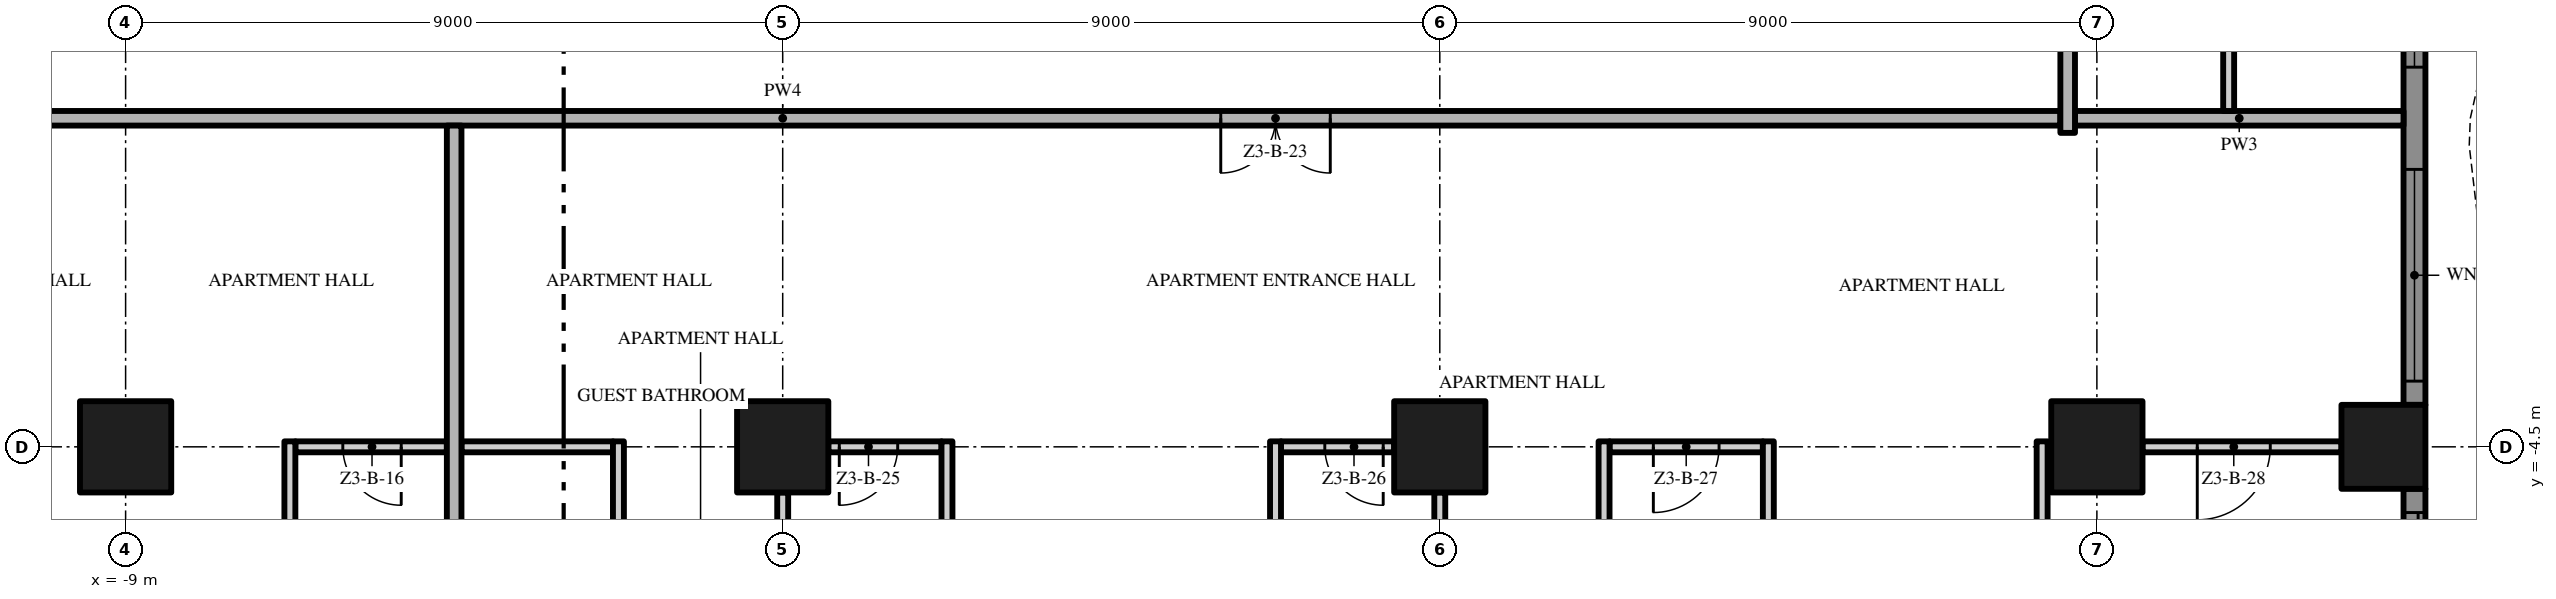
"""IFC4 building model, lengths in metres.
Left out: names, types, materials, properties, quantities, classifications, styles, units other than length and angle.
Written with IfcOpenShell. Run it as: python <this file> out.ifc"""

import sys

from ifc_helpers import new_model, si_unit, direction, frame, frame_2d, origin, origin_2d, place, context, subcontext, project, spatial, polyline, rectangle, outline, extrude, element, fill, save


model = new_model("IFC4")
c1 = context("Model", 3, precision=1e-05, world=origin(), true_north=direction((0.0, 1.0)))
c2 = subcontext(c1, "Body", "Model", "MODEL_VIEW")
j1 = project(units=[si_unit("LENGTHUNIT", "METRE"), si_unit("PLANEANGLEUNIT", "RADIAN")], contexts=[c1])
p1 = place(None, origin())
s1 = spatial("IfcSite", under=j1, at=p1, CompositionType="ELEMENT")
p2 = place(p1, origin())
s2 = spatial("IfcBuilding", under=s1, at=p2, CompositionType="ELEMENT")
p3 = place(p2, frame((0.0, 0.0, 140.2)))
s3 = spatial("IfcBuildingStorey", under=s2, at=p3, CompositionType="ELEMENT", Elevation=140.2)
for number, where, z_axis, x_axis in (
    (1, (-9.0, -4.5, 0.0), (0.0, 0.0, 1.0), (1.0, 0.0, 0.0)),
    (2, (0.0, -4.5, 0.0), (0.0, 0.0, 1.0), (1.0, 0.0, 0.0)),
    (3, (18.0, -4.5, 0.0), (0.0, 0.0, 1.0), (1.0, 0.0, 0.0)),
):
    element("IfcColumn", number, at=place(p3, frame(where, z_axis=z_axis, x_axis=x_axis)), inside=s3, PredefinedType="COLUMN", context=c2, shape_type="SweptSolid", body=[
        extrude(rectangle(XDim=1.25, YDim=1.25, at=origin_2d()), origin(), (0.0, 0.0, 1.0), 3.5),
    ])
p4 = place(p3, frame((21.925, -4.5, 0.0), z_axis=(0.0, 0.0, 1.0), x_axis=(1.0, 0.0, 0.0)))
e4 = element("IfcColumn", 4, at=p4, inside=s3, PredefinedType="COLUMN", context=c2, shape_type="SweptSolid", body=[
    extrude(rectangle(XDim=1.15, YDim=1.15, at=origin_2d()), origin(), (0.0, 0.0, 1.0), 3.5),
])
p5 = place(p3, frame((9.0, -4.5, 0.0), z_axis=(0.0, 0.0, 1.0), x_axis=(1.0, 0.0, 0.0)))
e5 = element("IfcColumn", 5, at=p5, inside=s3, PredefinedType="COLUMN", context=c2, shape_type="SweptSolid", body=[
    extrude(rectangle(XDim=1.25, YDim=1.25, at=origin_2d()), origin(), (0.0, 0.0, 1.0), 3.5),
])
p6 = place(p3, frame((22.35, -5.075, 0.0), z_axis=(0.0, 0.0, 1.0), x_axis=(0.0, -1.0, 0.0)))
e6 = element("IfcWall", 6, at=p6, inside=s3, PredefinedType="SOLIDWALL", context=c2, shape_type="SweptSolid", body=[
    extrude(rectangle(XDim=7.275, YDim=0.3, at=frame_2d((3.638, 0.0))), origin(), (0.0, 0.0, 1.0), 3.5),
])
p7 = place(p6, frame((4.625, 0.0, 0.45)))
e7 = element("IfcOpeningElement", 7, at=p7, cuts=e6, PredefinedType="OPENING", context=c2, shape_type="SweptSolid", body=[
    extrude(rectangle(XDim=2.35, YDim=2.65, at=frame_2d((1.175, 1.325))), frame((0.0, 0.16, 0.0), z_axis=(0.0, -1.0, 0.0), x_axis=(1.0, 0.0, 0.0)), (0.0, 0.0, 1.0), 0.32),
])
p8 = place(p6, frame((0.325, 0.0, 0.0)))
e8 = element("IfcOpeningElement", 8, at=p8, cuts=e6, PredefinedType="OPENING", context=c2, shape_type="SweptSolid", body=[
    extrude(rectangle(XDim=2.9, YDim=2.4, at=frame_2d((1.45, 1.2))), frame((0.0, 0.16, 0.0), z_axis=(0.0, -1.0, 0.0), x_axis=(1.0, 0.0, 0.0)), (0.0, 0.0, 1.0), 0.32),
])
p9 = place(p3, frame((22.35, 3.925, 0.0), z_axis=(0.0, 0.0, 1.0), x_axis=(0.0, -1.0, 0.0)))
e9 = element("IfcWall", 9, at=p9, inside=s3, PredefinedType="SOLIDWALL", context=c2, shape_type="SweptSolid", body=[
    extrude(rectangle(XDim=7.85, YDim=0.3, at=frame_2d((3.925, 0.0))), origin(), (0.0, 0.0, 1.0), 3.5),
])
p10 = place(p9, frame((4.625, 0.0, 0.45)))
e10 = element("IfcOpeningElement", 10, at=p10, cuts=e9, PredefinedType="OPENING", context=c2, shape_type="SweptSolid", body=[
    extrude(rectangle(XDim=2.9, YDim=2.65, at=frame_2d((1.45, 1.325))), frame((0.0, 0.16, 0.0), z_axis=(0.0, -1.0, 0.0), x_axis=(1.0, 0.0, 0.0)), (0.0, 0.0, 1.0), 0.32),
])
p11 = place(p9, frame((0.325, 0.0, 0.45)))
e11 = element("IfcOpeningElement", 11, at=p11, cuts=e9, PredefinedType="OPENING", context=c2, shape_type="SweptSolid", body=[
    extrude(rectangle(XDim=2.9, YDim=2.65, at=frame_2d((1.45, 1.325))), frame((0.0, 0.16, 0.0), z_axis=(0.0, -1.0, 0.0), x_axis=(1.0, 0.0, 0.0)), (0.0, 0.0, 1.0), 0.32),
])
p12 = place(p3, origin())
e12 = element("IfcWall", 12, at=p12, inside=s3, PredefinedType="USERDEFINED", context=c2, shape_type="SweptSolid", body=[
    extrude(outline(polyline([(23.451, -13.5), (24.112, -12.0), (24.845, -10.5), (25.369, -9.0), (25.5, -7.875), (25.485, -7.5), (25.149, -6.0), (24.488, -4.5), (23.755, -3.0), (23.231, -1.5), (23.1, -0.375), (23.115, 0.0), (23.451, 1.5), (24.112, 3.0), (24.845, 4.5), (25.369, 6.0), (25.5, 7.125), (25.485, 7.5), (25.149, 9.0), (24.488, 10.5), (23.755, 12.0), (23.231, 13.5), (23.1, 14.625), (23.115, 15.0), (23.451, 16.5), (24.112, 18.0), (23.883, 18.101), (23.213, 16.579), (22.866, 15.033), (22.849, 14.615), (22.986, 13.444), (23.524, 11.904), (24.261, 10.395), (24.91, 8.921), (25.236, 7.467), (25.249, 7.135), (25.124, 6.056), (24.614, 4.596), (23.885, 3.105), (23.213, 1.579), (22.866, 0.033), (22.849, -0.385), (22.986, -1.556), (23.524, -3.096), (24.261, -4.605), (24.91, -6.079), (25.236, -7.533), (25.249, -7.865), (25.124, -8.944), (24.614, -10.404), (23.885, -11.895), (23.223, -13.399), (23.451, -13.5)])), origin(), (0.0, 0.0, 1.0), 0.9),
])
p13 = place(p3, frame((-4.6, -4.5, 0.0), z_axis=(0.0, 0.0, 1.0), x_axis=(-1.0, 0.0, 0.0)))
e13 = element("IfcWall", 13, at=p13, inside=s3, PredefinedType="PARTITIONING", context=c2, shape_type="SweptSolid", body=[
    extrude(rectangle(XDim=2.075, YDim=0.15, at=frame_2d((1.038, 0.0))), origin(), (0.0, 0.0, 1.0), 3.5),
])
p14 = place(p13, frame((0.625, 0.0, 0.0)))
e14 = element("IfcOpeningElement", 14, at=p14, cuts=e13, PredefinedType="OPENING", context=c2, shape_type="SweptSolid", body=[
    extrude(rectangle(XDim=0.8, YDim=2.0, at=frame_2d((0.4, 1.0))), frame((0.0, 0.085, 0.0), z_axis=(0.0, -1.0, 0.0), x_axis=(1.0, 0.0, 0.0)), (0.0, 0.0, 1.0), 0.17),
])
p15 = place(p3, frame((-4.4, -4.5, 0.0), z_axis=(0.0, 0.0, 1.0), x_axis=(1.0, 0.0, 0.0)))
e15 = element("IfcWall", 15, at=p15, inside=s3, PredefinedType="PARTITIONING", context=c2, shape_type="SweptSolid", body=[
    extrude(rectangle(XDim=2.075, YDim=0.15, at=frame_2d((1.038, 0.0))), origin(), (0.0, 0.0, 1.0), 3.5),
])
p16 = place(p3, frame((2.175, -4.5, 0.0), z_axis=(0.0, 0.0, 1.0), x_axis=(-1.0, 0.0, 0.0)))
e16 = element("IfcWall", 16, at=p16, inside=s3, PredefinedType="PARTITIONING", context=c2, shape_type="SweptSolid", body=[
    extrude(rectangle(XDim=1.55, YDim=0.15, at=frame_2d((0.775, 0.0))), origin(), (0.0, 0.0, 1.0), 3.5),
])
p17 = place(p16, frame((0.6, 0.0, 0.0)))
e17 = element("IfcOpeningElement", 17, at=p17, cuts=e16, PredefinedType="OPENING", context=c2, shape_type="SweptSolid", body=[
    extrude(rectangle(XDim=0.8, YDim=2.0, at=frame_2d((0.4, 1.0))), frame((0.0, 0.085, 0.0), z_axis=(0.0, -1.0, 0.0), x_axis=(1.0, 0.0, 0.0)), (0.0, 0.0, 1.0), 0.17),
])
p18 = place(p3, frame((8.375, -4.5, 0.0), z_axis=(0.0, 0.0, 1.0), x_axis=(-1.0, 0.0, 0.0)))
e18 = element("IfcWall", 18, at=p18, inside=s3, PredefinedType="PARTITIONING", context=c2, shape_type="SweptSolid", body=[
    extrude(rectangle(XDim=1.55, YDim=0.15, at=frame_2d((0.775, 0.0))), origin(), (0.0, 0.0, 1.0), 3.5),
])
p19 = place(p18, frame((0.15, 0.0, 0.0)))
e19 = element("IfcOpeningElement", 19, at=p19, cuts=e18, PredefinedType="OPENING", context=c2, shape_type="SweptSolid", body=[
    extrude(rectangle(XDim=0.8, YDim=2.0, at=frame_2d((0.4, 1.0))), frame((0.0, 0.085, 0.0), z_axis=(0.0, -1.0, 0.0), x_axis=(1.0, 0.0, 0.0)), (0.0, 0.0, 1.0), 0.17),
])
p20 = place(p3, frame((13.425, -4.5, 0.0), z_axis=(0.0, 0.0, 1.0), x_axis=(-1.0, 0.0, 0.0)))
e20 = element("IfcWall", 20, at=p20, inside=s3, PredefinedType="PARTITIONING", context=c2, shape_type="SweptSolid", body=[
    extrude(rectangle(XDim=2.1, YDim=0.15, at=frame_2d((1.05, 0.0))), origin(), (0.0, 0.0, 1.0), 3.5),
])
p21 = place(p20, frame((0.6, 0.0, 0.0)))
e21 = element("IfcOpeningElement", 21, at=p21, cuts=e20, PredefinedType="OPENING", context=c2, shape_type="SweptSolid", body=[
    extrude(rectangle(XDim=0.9, YDim=2.1, at=frame_2d((0.45, 1.05))), frame((0.0, 0.085, 0.0), z_axis=(0.0, -1.0, 0.0), x_axis=(1.0, 0.0, 0.0)), (0.0, 0.0, 1.0), 0.17),
])
p22 = place(p3, frame((21.35, -4.5, 0.0), z_axis=(0.0, 0.0, 1.0), x_axis=(-1.0, 0.0, 0.0)))
e22 = element("IfcWall", 22, at=p22, inside=s3, PredefinedType="PARTITIONING", context=c2, shape_type="SweptSolid", body=[
    extrude(rectangle(XDim=2.725, YDim=0.15, at=frame_2d((1.363, 0.0))), origin(), (0.0, 0.0, 1.0), 3.5),
])
p23 = place(p22, frame((0.975, 0.0, 0.0)))
e23 = element("IfcOpeningElement", 23, at=p23, cuts=e22, PredefinedType="OPENING", context=c2, shape_type="SweptSolid", body=[
    extrude(rectangle(XDim=1.0, YDim=2.4, at=frame_2d((0.5, 1.2))), frame((0.0, 0.085, 0.0), z_axis=(0.0, -1.0, 0.0), x_axis=(1.0, 0.0, 0.0)), (0.0, 0.0, 1.0), 0.17),
])
p24 = place(p3, frame((17.5, 0.0, 0.0), z_axis=(0.0, 0.0, 1.0), x_axis=(-1.0, 0.0, 0.0)))
e24 = element("IfcWall", 24, at=p24, inside=s3, PredefinedType="PARTITIONING", context=c2, shape_type="SweptSolid", body=[
    extrude(rectangle(XDim=35.0, YDim=0.2, at=frame_2d((17.5, 0.0))), origin(), (0.0, 0.0, 1.0), 3.5),
])
p25 = place(p24, frame((28.0, 0.0, 0.0)))
e25 = element("IfcOpeningElement", 25, at=p25, cuts=e24, PredefinedType="OPENING", context=c2, shape_type="SweptSolid", body=[
    extrude(rectangle(XDim=1.5, YDim=2.4, at=frame_2d((0.75, 1.2))), frame((0.0, 0.11, 0.0), z_axis=(0.0, -1.0, 0.0), x_axis=(1.0, 0.0, 0.0)), (0.0, 0.0, 1.0), 0.22),
])
p26 = place(p24, frame((10.0, 0.0, 0.0)))
e26 = element("IfcOpeningElement", 26, at=p26, cuts=e24, PredefinedType="OPENING", context=c2, shape_type="SweptSolid", body=[
    extrude(rectangle(XDim=1.5, YDim=2.4, at=frame_2d((0.75, 1.2))), frame((0.0, 0.11, 0.0), z_axis=(0.0, -1.0, 0.0), x_axis=(1.0, 0.0, 0.0)), (0.0, 0.0, 1.0), 0.22),
])
p27 = place(p3, frame((17.7, 0.0, 0.0), z_axis=(0.0, 0.0, 1.0), x_axis=(1.0, 0.0, 0.0)))
e27 = element("IfcWall", 27, at=p27, inside=s3, PredefinedType="PARTITIONING", context=c2, shape_type="SweptSolid", body=[
    extrude(rectangle(XDim=4.5, YDim=0.2, at=frame_2d((2.25, 0.0))), origin(), (0.0, 0.0, 1.0), 3.5),
])
p28 = place(p3, frame((-6.75, -12.075, 0.0), z_axis=(0.0, 0.0, 1.0), x_axis=(0.0, 1.0, 0.0)))
e28 = element("IfcWall", 28, at=p28, inside=s3, PredefinedType="PARTITIONING", context=c2, shape_type="SweptSolid", body=[
    extrude(rectangle(XDim=7.65, YDim=0.15, at=frame_2d((3.825, 0.0))), origin(), (0.0, 0.0, 1.0), 3.5),
])
p29 = place(p3, frame((-4.5, -17.7, 0.0), z_axis=(0.0, 0.0, 1.0), x_axis=(0.0, 1.0, 0.0)))
e29 = element("IfcWall", 29, at=p29, inside=s3, PredefinedType="PARTITIONING", context=c2, shape_type="SweptSolid", body=[
    extrude(rectangle(XDim=17.6, YDim=0.2, at=frame_2d((8.8, 0.0))), origin(), (0.0, 0.0, 1.0), 3.5),
])
p30 = place(p3, frame((-2.25, -12.075, 0.0), z_axis=(0.0, 0.0, 1.0), x_axis=(0.0, 1.0, 0.0)))
e30 = element("IfcWall", 30, at=p30, inside=s3, PredefinedType="PARTITIONING", context=c2, shape_type="SweptSolid", body=[
    extrude(rectangle(XDim=7.65, YDim=0.15, at=frame_2d((3.825, 0.0))), origin(), (0.0, 0.0, 1.0), 3.5),
])
p31 = place(p30, frame((4.875, 0.0, 0.0)))
e31 = element("IfcOpeningElement", 31, at=p31, cuts=e30, PredefinedType="OPENING", context=c2, shape_type="SweptSolid", body=[
    extrude(rectangle(XDim=0.9, YDim=2.1, at=frame_2d((0.45, 1.05))), frame((0.0, 0.085, 0.0), z_axis=(0.0, -1.0, 0.0), x_axis=(1.0, 0.0, 0.0)), (0.0, 0.0, 1.0), 0.17),
])
p32 = place(p30, frame((1.125, 0.0, 0.0)))
e32 = element("IfcOpeningElement", 32, at=p32, cuts=e30, PredefinedType="OPENING", context=c2, shape_type="SweptSolid", body=[
    extrude(rectangle(XDim=0.9, YDim=2.1, at=frame_2d((0.45, 1.05))), frame((0.0, 0.085, 0.0), z_axis=(0.0, -1.0, 0.0), x_axis=(1.0, 0.0, 0.0)), (0.0, 0.0, 1.0), 0.17),
])
p33 = place(p3, frame((0.0, -12.875, 0.0), z_axis=(0.0, 0.0, 1.0), x_axis=(0.0, 1.0, 0.0)))
e33 = element("IfcWall", 33, at=p33, inside=s3, PredefinedType="PARTITIONING", context=c2, shape_type="SweptSolid", body=[
    extrude(rectangle(XDim=7.75, YDim=0.15, at=frame_2d((3.875, 0.0))), origin(), (0.0, 0.0, 1.0), 3.5),
])
for number, where, z_axis, x_axis in (
    (34, (2.25, -12.075, 0.0), (0.0, 0.0, 1.0), (0.0, 1.0, 0.0)),
    (35, (6.75, -12.075, 0.0), (0.0, 0.0, 1.0), (0.0, 1.0, 0.0)),
):
    element("IfcWall", number, at=place(p3, frame(where, z_axis=z_axis, x_axis=x_axis)), inside=s3, PredefinedType="PARTITIONING", context=c2, shape_type="SweptSolid", body=[
        extrude(rectangle(XDim=7.65, YDim=0.15, at=frame_2d((3.825, 0.0))), origin(), (0.0, 0.0, 1.0), 3.5),
    ])
p34 = place(p3, frame((9.0, -12.875, 0.0), z_axis=(0.0, 0.0, 1.0), x_axis=(0.0, 1.0, 0.0)))
e36 = element("IfcWall", 36, at=p34, inside=s3, PredefinedType="PARTITIONING", context=c2, shape_type="SweptSolid", body=[
    extrude(rectangle(XDim=7.75, YDim=0.15, at=frame_2d((3.875, 0.0))), origin(), (0.0, 0.0, 1.0), 3.5),
])
p35 = place(p3, frame((11.25, -8.925, 0.0), z_axis=(0.0, 0.0, 1.0), x_axis=(0.0, 1.0, 0.0)))
e37 = element("IfcWall", 37, at=p35, inside=s3, PredefinedType="PARTITIONING", context=c2, shape_type="SweptSolid", body=[
    extrude(rectangle(XDim=4.5, YDim=0.15, at=frame_2d((2.25, 0.0))), origin(), (0.0, 0.0, 1.0), 3.5),
])
p36 = place(p3, frame((13.5, -17.7, 0.0), z_axis=(0.0, 0.0, 1.0), x_axis=(0.0, 1.0, 0.0)))
e38 = element("IfcWall", 38, at=p36, inside=s3, PredefinedType="PARTITIONING", context=c2, shape_type="SweptSolid", body=[
    extrude(rectangle(XDim=13.275, YDim=0.15, at=frame_2d((6.638, 0.0))), origin(), (0.0, 0.0, 1.0), 3.5),
])
p37 = place(p3, frame((17.25, -8.925, 0.0), z_axis=(0.0, 0.0, 1.0), x_axis=(0.0, 1.0, 0.0)))
e39 = element("IfcWall", 39, at=p37, inside=s3, PredefinedType="PARTITIONING", context=c2, shape_type="SweptSolid", body=[
    extrude(rectangle(XDim=4.5, YDim=0.15, at=frame_2d((2.25, 0.0))), origin(), (0.0, 0.0, 1.0), 3.5),
])
p38 = place(p3, frame((17.6, -0.2, 0.0), z_axis=(0.0, 0.0, 1.0), x_axis=(0.0, 1.0, 0.0)))
e40 = element("IfcWall", 40, at=p38, inside=s3, PredefinedType="PARTITIONING", context=c2, shape_type="SweptSolid", body=[
    extrude(rectangle(XDim=4.075, YDim=0.2, at=frame_2d((2.038, 0.0))), origin(), (0.0, 0.0, 1.0), 3.5),
])
p39 = place(p3, frame((19.805, 0.1, 0.0), z_axis=(0.0, 0.0, 1.0), x_axis=(0.0, 1.0, 0.0)))
e41 = element("IfcWall", 41, at=p39, inside=s3, PredefinedType="PARTITIONING", context=c2, shape_type="SweptSolid", body=[
    extrude(rectangle(XDim=2.225, YDim=0.15, at=frame_2d((1.113, 0.0))), origin(), (0.0, 0.0, 1.0), 3.5),
])
p40 = place(p8, origin())
e42 = element("IfcDoor", 42, at=p40, inside=s3, OperationType="SINGLE_SWING_LEFT", PredefinedType="DOOR", context=c2, shape_type="SweptSolid", body=[
    extrude(rectangle(XDim=2.9, YDim=2.4, at=frame_2d((1.45, 1.2))), frame((0.0, 0.025, 0.0), z_axis=(0.0, -1.0, 0.0), x_axis=(1.0, 0.0, 0.0)), (0.0, 0.0, 1.0), 0.05),
])
fill(e8, e42)
p41 = place(p10, origin())
e43 = element("IfcWindow", 43, at=p41, inside=s3, PartitioningType="SINGLE_PANEL", PredefinedType="WINDOW", context=c2, shape_type="SweptSolid", body=[
    extrude(rectangle(XDim=2.9, YDim=2.65, at=frame_2d((1.45, 1.325))), frame((0.0, 0.03, 0.0), z_axis=(0.0, -1.0, 0.0), x_axis=(1.0, 0.0, 0.0)), (0.0, 0.0, 1.0), 0.06),
])
fill(e10, e43)
p42 = place(p11, origin())
e44 = element("IfcWindow", 44, at=p42, inside=s3, PartitioningType="SINGLE_PANEL", PredefinedType="WINDOW", context=c2, shape_type="SweptSolid", body=[
    extrude(rectangle(XDim=2.9, YDim=2.65, at=frame_2d((1.45, 1.325))), frame((0.0, 0.03, 0.0), z_axis=(0.0, -1.0, 0.0), x_axis=(1.0, 0.0, 0.0)), (0.0, 0.0, 1.0), 0.06),
])
fill(e11, e44)
p43 = place(p14, origin())
e45 = element("IfcDoor", 45, at=p43, inside=s3, OperationType="SINGLE_SWING_LEFT", PredefinedType="DOOR", context=c2, shape_type="SweptSolid", body=[
    extrude(rectangle(XDim=0.8, YDim=2.0, at=frame_2d((0.4, 1.0))), frame((0.0, 0.025, 0.0), z_axis=(0.0, -1.0, 0.0), x_axis=(1.0, 0.0, 0.0)), (0.0, 0.0, 1.0), 0.05),
])
fill(e14, e45)
p44 = place(p26, origin())
e46 = element("IfcDoor", 46, at=p44, inside=s3, OperationType="DOUBLE_DOOR_SINGLE_SWING", PredefinedType="DOOR", context=c2, shape_type="SweptSolid", body=[
    extrude(rectangle(XDim=1.5, YDim=2.4, at=frame_2d((0.75, 1.2))), frame((0.0, 0.025, 0.0), z_axis=(0.0, -1.0, 0.0), x_axis=(1.0, 0.0, 0.0)), (0.0, 0.0, 1.0), 0.05),
])
fill(e26, e46)
p45 = place(p17, origin())
e47 = element("IfcDoor", 47, at=p45, inside=s3, OperationType="SINGLE_SWING_RIGHT", PredefinedType="DOOR", context=c2, shape_type="SweptSolid", body=[
    extrude(rectangle(XDim=0.8, YDim=2.0, at=frame_2d((0.4, 1.0))), frame((0.0, 0.025, 0.0), z_axis=(0.0, -1.0, 0.0), x_axis=(1.0, 0.0, 0.0)), (0.0, 0.0, 1.0), 0.05),
])
fill(e17, e47)
p46 = place(p19, origin())
e48 = element("IfcDoor", 48, at=p46, inside=s3, OperationType="SINGLE_SWING_LEFT", PredefinedType="DOOR", context=c2, shape_type="SweptSolid", body=[
    extrude(rectangle(XDim=0.8, YDim=2.0, at=frame_2d((0.4, 1.0))), frame((0.0, 0.025, 0.0), z_axis=(0.0, -1.0, 0.0), x_axis=(1.0, 0.0, 0.0)), (0.0, 0.0, 1.0), 0.05),
])
fill(e19, e48)
p47 = place(p21, origin())
e49 = element("IfcDoor", 49, at=p47, inside=s3, OperationType="SINGLE_SWING_RIGHT", PredefinedType="DOOR", context=c2, shape_type="SweptSolid", body=[
    extrude(rectangle(XDim=0.9, YDim=2.1, at=frame_2d((0.45, 1.05))), frame((0.0, 0.025, 0.0), z_axis=(0.0, -1.0, 0.0), x_axis=(1.0, 0.0, 0.0)), (0.0, 0.0, 1.0), 0.05),
])
fill(e21, e49)
p48 = place(p23, origin())
e50 = element("IfcDoor", 50, at=p48, inside=s3, OperationType="SINGLE_SWING_RIGHT", PredefinedType="DOOR", context=c2, shape_type="SweptSolid", body=[
    extrude(rectangle(XDim=1.0, YDim=2.4, at=frame_2d((0.5, 1.2))), frame((0.0, 0.025, 0.0), z_axis=(0.0, -1.0, 0.0), x_axis=(1.0, 0.0, 0.0)), (0.0, 0.0, 1.0), 0.05),
])
fill(e23, e50)
save(model, sys.argv[1])
